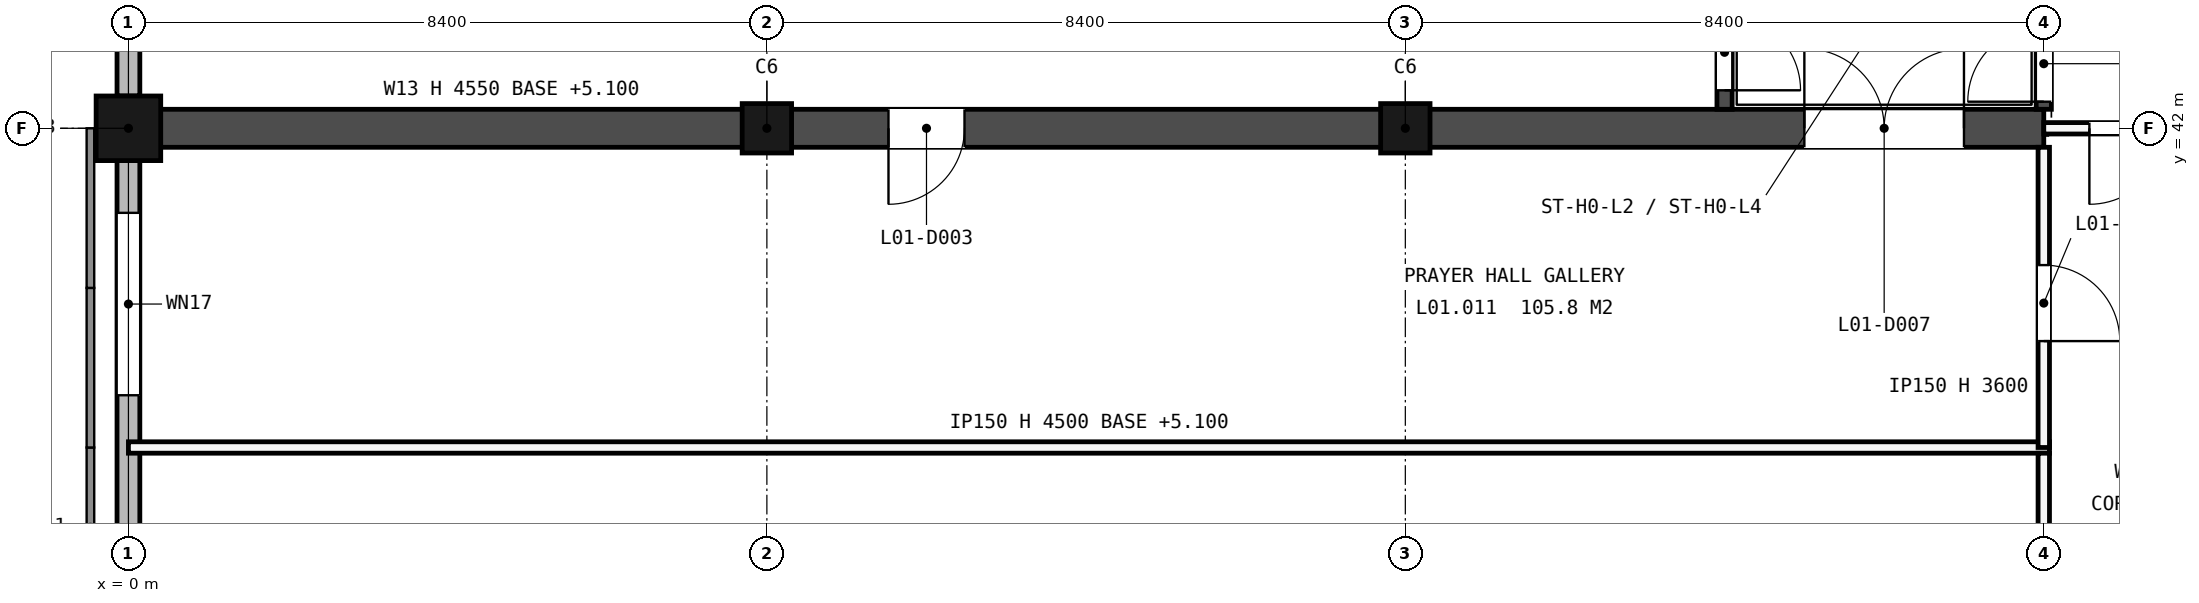
"""IFC4 building model, lengths in metres.
Left out: names, types, materials, properties, quantities, classifications, styles, units other than length and angle.
Written with IfcOpenShell. Run it as: python <this file> out.ifc"""

import sys

from ifc_helpers import new_model, si_unit, direction, frame, frame_2d, origin, origin_2d, place, context, subcontext, project, spatial, rectangle, extrude, element, fill, save


model = new_model("IFC4")
c1 = context("Model", 3, precision=1e-05, world=origin(), true_north=direction((0.0, 1.0)))
c2 = subcontext(c1, "Body", "Model", "MODEL_VIEW")
j1 = project(units=[si_unit("LENGTHUNIT", "METRE"), si_unit("PLANEANGLEUNIT", "RADIAN")], contexts=[c1])
p1 = place(None, origin())
s1 = spatial("IfcSite", under=j1, at=p1, CompositionType="ELEMENT")
p2 = place(p1, origin())
s2 = spatial("IfcBuilding", under=s1, at=p2, CompositionType="ELEMENT")
p3 = place(p2, frame((0.0, 0.0, 5.4)))
s3 = spatial("IfcBuildingStorey", under=s2, at=p3, CompositionType="ELEMENT", Elevation=5.4)
p4 = place(p3, frame((0.0, 42.0, -0.3), z_axis=(0.0, 0.0, 1.0), x_axis=(1.0, 0.0, 0.0)))
e1 = element("IfcColumn", 1, at=p4, inside=s3, PredefinedType="COLUMN", context=c2, shape_type="SweptSolid", body=[
    extrude(rectangle(XDim=0.85, YDim=0.85, at=origin_2d()), origin(), (0.0, 0.0, 1.0), 4.55),
])
for number, where, z_axis, x_axis in (
    (2, (8.4, 42.0, -0.3), (0.0, 0.0, 1.0), (1.0, 0.0, 0.0)),
    (3, (16.8, 42.0, -0.3), (0.0, 0.0, 1.0), (1.0, 0.0, 0.0)),
):
    element("IfcColumn", number, at=place(p3, frame(where, z_axis=z_axis, x_axis=x_axis)), inside=s3, PredefinedType="COLUMN", context=c2, shape_type="SweptSolid", body=[
        extrude(rectangle(XDim=0.65, YDim=0.65, at=origin_2d()), origin(), (0.0, 0.0, 1.0), 4.55),
    ])
p5 = place(p3, frame((0.0, 42.0, -0.3), z_axis=(0.0, 0.0, 1.0), x_axis=(1.0, 0.0, 0.0)))
e4 = element("IfcWall", 4, at=p5, inside=s3, PredefinedType="SHEAR", context=c2, shape_type="SweptSolid", body=[
    extrude(rectangle(XDim=25.2, YDim=0.5, at=frame_2d((12.6, 0.0))), origin(), (0.0, 0.0, 1.0), 4.55),
])
p6 = place(p5, frame((22.05, 0.0, 0.3)))
e5 = element("IfcOpeningElement", 5, at=p6, cuts=e4, PredefinedType="OPENING", context=c2, shape_type="SweptSolid", body=[
    extrude(rectangle(XDim=2.1, YDim=2.1, at=frame_2d((1.05, 1.05))), frame((0.0, 0.26, 0.0), z_axis=(0.0, -1.0, 0.0), x_axis=(1.0, 0.0, 0.0)), (0.0, 0.0, 1.0), 0.52),
])
p7 = place(p5, frame((10.0, 0.0, 0.3)))
e6 = element("IfcOpeningElement", 6, at=p7, cuts=e4, PredefinedType="OPENING", context=c2, shape_type="SweptSolid", body=[
    extrude(rectangle(XDim=1.0, YDim=2.1, at=frame_2d((0.5, 1.05))), frame((0.0, 0.26, 0.0), z_axis=(0.0, -1.0, 0.0), x_axis=(1.0, 0.0, 0.0)), (0.0, 0.0, 1.0), 0.52),
])
p8 = place(p3, frame((0.0, 8.825, 0.0), z_axis=(0.0, 0.0, 1.0), x_axis=(0.0, 1.0, 0.0)))
e7 = element("IfcWall", 7, at=p8, inside=s3, PredefinedType="STANDARD", context=c2, shape_type="SweptSolid", body=[
    extrude(rectangle(XDim=32.75, YDim=0.3, at=frame_2d((16.375, 0.0))), origin(), (0.0, 0.0, 1.0), 3.4),
])
p9 = place(p8, frame((29.663, 0.0, 0.9)))
e8 = element("IfcOpeningElement", 8, at=p9, cuts=e7, PredefinedType="OPENING", context=c2, shape_type="SweptSolid", body=[
    extrude(rectangle(XDim=2.4, YDim=1.5, at=frame_2d((1.2, 0.75))), frame((0.0, 0.16, 0.0), z_axis=(0.0, -1.0, 0.0), x_axis=(1.0, 0.0, 0.0)), (0.0, 0.0, 1.0), 0.32),
])
p10 = place(p3, frame((0.0, 42.425, 0.0), z_axis=(0.0, 0.0, 1.0), x_axis=(0.0, 1.0, 0.0)))
e9 = element("IfcWall", 9, at=p10, inside=s3, PredefinedType="STANDARD", context=c2, shape_type="SweptSolid", body=[
    extrude(rectangle(XDim=7.55, YDim=0.3, at=frame_2d((3.775, 0.0))), origin(), (0.0, 0.0, 1.0), 3.6),
])
p11 = place(p10, frame((3.562, 0.0, 2.4)))
e10 = element("IfcOpeningElement", 10, at=p11, cuts=e9, PredefinedType="OPENING", context=c2, shape_type="SweptSolid", body=[
    extrude(rectangle(XDim=3.0, YDim=0.9, at=frame_2d((1.5, 0.45))), frame((0.0, 0.16, 0.0), z_axis=(0.0, -1.0, 0.0), x_axis=(1.0, 0.0, 0.0)), (0.0, 0.0, 1.0), 0.32),
])
p12 = place(p3, frame((21.0, 42.25, -0.3), z_axis=(0.0, 0.0, 1.0), x_axis=(0.0, 1.0, 0.0)))
e11 = element("IfcWall", 11, at=p12, inside=s3, PredefinedType="SHEAR", context=c2, shape_type="SweptSolid", body=[
    extrude(rectangle(XDim=7.775, YDim=0.2, at=frame_2d((3.887, 0.0))), origin(), (0.0, 0.0, 1.0), 4.5),
])
p13 = place(p12, frame((0.25, 0.0, 0.3)))
e12 = element("IfcOpeningElement", 12, at=p13, cuts=e11, PredefinedType="OPENING", context=c2, shape_type="SweptSolid", body=[
    extrude(rectangle(XDim=1.0, YDim=2.1, at=frame_2d((0.5, 1.05))), frame((0.0, 0.11, 0.0), z_axis=(0.0, -1.0, 0.0), x_axis=(1.0, 0.0, 0.0)), (0.0, 0.0, 1.0), 0.22),
])
p14 = place(p3, frame((25.2, 42.25, -0.3), z_axis=(0.0, 0.0, 1.0), x_axis=(0.0, 1.0, 0.0)))
e13 = element("IfcWall", 13, at=p14, inside=s3, PredefinedType="SHEAR", context=c2, shape_type="SweptSolid", body=[
    extrude(rectangle(XDim=7.775, YDim=0.2, at=frame_2d((3.887, 0.0))), origin(), (0.0, 0.0, 1.0), 4.5),
])
p15 = place(p14, frame((0.1, 0.0, 0.3)))
e14 = element("IfcOpeningElement", 14, at=p15, cuts=e13, PredefinedType="OPENING", context=c2, shape_type="SweptSolid", body=[
    extrude(rectangle(XDim=1.0, YDim=2.1, at=frame_2d((0.5, 1.05))), frame((0.0, 0.11, 0.0), z_axis=(0.0, -1.0, 0.0), x_axis=(1.0, 0.0, 0.0)), (0.0, 0.0, 1.0), 0.22),
])
p16 = place(p3, frame((0.0, 37.8, -0.3), z_axis=(0.0, 0.0, 1.0), x_axis=(1.0, 0.0, 0.0)))
e15 = element("IfcWall", 15, at=p16, inside=s3, PredefinedType="PARTITIONING", context=c2, shape_type="SweptSolid", body=[
    extrude(rectangle(XDim=25.275, YDim=0.15, at=frame_2d((12.637, 0.0))), origin(), (0.0, 0.0, 1.0), 4.5),
])
p17 = place(p3, frame((25.2, 8.65, -0.3), z_axis=(0.0, 0.0, 1.0), x_axis=(0.0, 1.0, 0.0)))
e16 = element("IfcWall", 16, at=p17, inside=s3, PredefinedType="PARTITIONING", context=c2, shape_type="SweptSolid", body=[
    extrude(rectangle(XDim=29.075, YDim=0.15, at=frame_2d((14.538, 0.0))), origin(), (0.0, 0.0, 1.0), 3.9),
])
p18 = place(p3, frame((25.2, 42.0, 0.0), z_axis=(0.0, 0.0, 1.0), x_axis=(1.0, 0.0, 0.0)))
e17 = element("IfcWall", 17, at=p18, inside=s3, PredefinedType="PARTITIONING", context=c2, shape_type="SweptSolid", body=[
    extrude(rectangle(XDim=12.5, YDim=0.15, at=frame_2d((6.25, 0.0))), origin(), (0.0, 0.0, 1.0), 4.2),
])
p19 = place(p18, frame((0.6, 0.0, 0.0)))
e18 = element("IfcOpeningElement", 18, at=p19, cuts=e17, PredefinedType="OPENING", context=c2, shape_type="SweptSolid", body=[
    extrude(rectangle(XDim=1.0, YDim=2.1, at=frame_2d((0.5, 1.05))), frame((0.0, 0.085, 0.0), z_axis=(0.0, -1.0, 0.0), x_axis=(1.0, 0.0, 0.0)), (0.0, 0.0, 1.0), 0.17),
])
p20 = place(p3, frame((25.2, 37.8, 0.0), z_axis=(0.0, 0.0, 1.0), x_axis=(0.0, 1.0, 0.0)))
e19 = element("IfcWall", 19, at=p20, inside=s3, PredefinedType="PARTITIONING", context=c2, shape_type="SweptSolid", body=[
    extrude(rectangle(XDim=3.95, YDim=0.15, at=frame_2d((1.975, 0.0))), origin(), (0.0, 0.0, 1.0), 3.6),
])
p21 = place(p20, frame((1.4, 0.0, 0.0)))
e20 = element("IfcOpeningElement", 20, at=p21, cuts=e19, PredefinedType="OPENING", context=c2, shape_type="SweptSolid", body=[
    extrude(rectangle(XDim=1.0, YDim=2.1, at=frame_2d((0.5, 1.05))), frame((0.0, 0.085, 0.0), z_axis=(0.0, -1.0, 0.0), x_axis=(1.0, 0.0, 0.0)), (0.0, 0.0, 1.0), 0.17),
])
p22 = place(p9, origin())
e21 = element("IfcWindow", 21, at=p22, inside=s3, PartitioningType="SINGLE_PANEL", PredefinedType="WINDOW", context=c2, shape_type="SweptSolid", body=[
    extrude(rectangle(XDim=2.4, YDim=1.5, at=frame_2d((1.2, 0.75))), frame((0.0, 0.03, 0.0), z_axis=(0.0, -1.0, 0.0), x_axis=(1.0, 0.0, 0.0)), (0.0, 0.0, 1.0), 0.06),
])
fill(e8, e21)
p23 = place(p6, origin())
e22 = element("IfcDoor", 22, at=p23, inside=s3, OperationType="DOUBLE_DOOR_SINGLE_SWING", PredefinedType="DOOR", context=c2, shape_type="SweptSolid", body=[
    extrude(rectangle(XDim=2.1, YDim=2.1, at=frame_2d((1.05, 1.05))), frame((0.0, 0.025, 0.0), z_axis=(0.0, -1.0, 0.0), x_axis=(1.0, 0.0, 0.0)), (0.0, 0.0, 1.0), 0.05),
])
fill(e5, e22)
p24 = place(p15, origin())
e23 = element("IfcDoor", 23, at=p24, inside=s3, OperationType="SINGLE_SWING_RIGHT", PredefinedType="DOOR", context=c2, shape_type="SweptSolid", body=[
    extrude(rectangle(XDim=1.0, YDim=2.1, at=frame_2d((0.5, 1.05))), frame((0.0, 0.025, 0.0), z_axis=(0.0, -1.0, 0.0), x_axis=(1.0, 0.0, 0.0)), (0.0, 0.0, 1.0), 0.05),
])
fill(e14, e23)
p25 = place(p7, origin())
e24 = element("IfcDoor", 24, at=p25, inside=s3, OperationType="SINGLE_SWING_LEFT", PredefinedType="DOOR", context=c2, shape_type="SweptSolid", body=[
    extrude(rectangle(XDim=1.0, YDim=2.1, at=frame_2d((0.5, 1.05))), frame((0.0, 0.025, 0.0), z_axis=(0.0, -1.0, 0.0), x_axis=(1.0, 0.0, 0.0)), (0.0, 0.0, 1.0), 0.05),
])
fill(e6, e24)
p26 = place(p21, origin())
e25 = element("IfcDoor", 25, at=p26, inside=s3, OperationType="SINGLE_SWING_LEFT", PredefinedType="DOOR", context=c2, shape_type="SweptSolid", body=[
    extrude(rectangle(XDim=1.0, YDim=2.1, at=frame_2d((0.5, 1.05))), frame((0.0, 0.025, 0.0), z_axis=(0.0, -1.0, 0.0), x_axis=(1.0, 0.0, 0.0)), (0.0, 0.0, 1.0), 0.05),
])
fill(e20, e25)
p27 = place(p13, origin())
e26 = element("IfcDoor", 26, at=p27, inside=s3, OperationType="SINGLE_SWING_LEFT", PredefinedType="DOOR", context=c2, shape_type="SweptSolid", body=[
    extrude(rectangle(XDim=1.0, YDim=2.1, at=frame_2d((0.5, 1.05))), frame((0.0, 0.025, 0.0), z_axis=(0.0, -1.0, 0.0), x_axis=(1.0, 0.0, 0.0)), (0.0, 0.0, 1.0), 0.05),
])
fill(e12, e26)
p28 = place(p19, origin())
e27 = element("IfcDoor", 27, at=p28, inside=s3, OperationType="SINGLE_SWING_LEFT", PredefinedType="DOOR", context=c2, shape_type="SweptSolid", body=[
    extrude(rectangle(XDim=1.0, YDim=2.1, at=frame_2d((0.5, 1.05))), frame((0.0, 0.025, 0.0), z_axis=(0.0, -1.0, 0.0), x_axis=(1.0, 0.0, 0.0)), (0.0, 0.0, 1.0), 0.05),
])
fill(e18, e27)
save(model, sys.argv[1])
